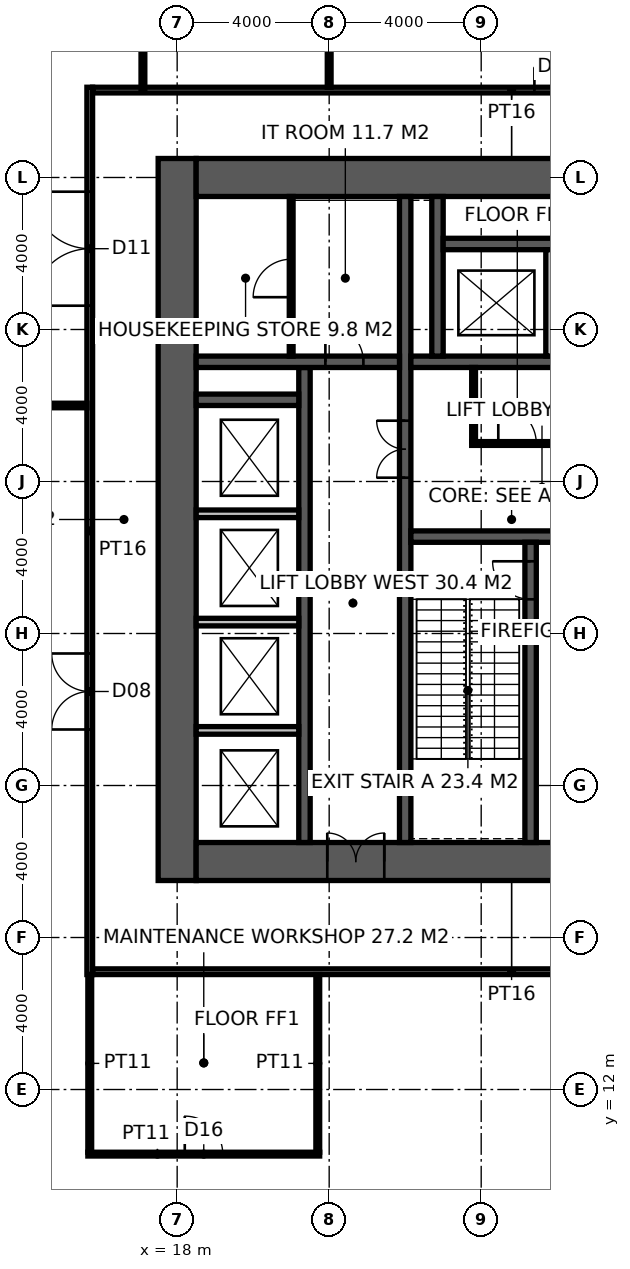
"""IFC4 building model, lengths in metres.
Left out: names, types, materials, properties, quantities, classifications, styles, units other than length and angle.
Written with IfcOpenShell. Run it as: python <this file> out.ifc"""

import sys

from ifc_helpers import new_model, si_unit, direction, frame, frame_2d, origin, place, context, subcontext, project, spatial, rectangle, extrude, element, fill, save


model = new_model("IFC4")
c1 = context("Model", 3, precision=1e-05, world=origin(), true_north=direction((0.0, 1.0)))
c2 = subcontext(c1, "Body", "Model", "MODEL_VIEW")
j1 = project(units=[si_unit("LENGTHUNIT", "METRE"), si_unit("PLANEANGLEUNIT", "RADIAN")], contexts=[c1])
p1 = place(None, origin())
s1 = spatial("IfcSite", under=j1, at=p1, CompositionType="ELEMENT")
p2 = place(p1, origin())
s2 = spatial("IfcBuilding", under=s1, at=p2, CompositionType="ELEMENT")
p3 = place(p2, frame((0.0, 0.0, 137.4)))
s3 = spatial("IfcBuildingStorey", under=s2, at=p3, CompositionType="ELEMENT", Elevation=137.4)
p4 = place(p3, frame((18.0, 17.5, -0.15), z_axis=(0.0, 0.0, 1.0), x_axis=(0.0, 1.0, 0.0)))
e1 = element("IfcWall", 1, at=p4, inside=s3, PredefinedType="SHEAR", context=c2, shape_type="SweptSolid", body=[
    extrude(rectangle(XDim=19.0, YDim=1.0, at=frame_2d((9.5, 0.0))), origin(), (0.0, 0.0, 1.0), 5.4),
])
p5 = place(p3, frame((18.5, 18.0, -0.15), z_axis=(0.0, 0.0, 1.0), x_axis=(1.0, 0.0, 0.0)))
e2 = element("IfcWall", 2, at=p5, inside=s3, PredefinedType="SHEAR", context=c2, shape_type="SweptSolid", body=[
    extrude(rectangle(XDim=17.6, YDim=1.0, at=frame_2d((8.8, 0.0))), origin(), (0.0, 0.0, 1.0), 5.4),
])
p6 = place(p5, frame((3.45, 0.0, 0.15)))
e3 = element("IfcOpeningElement", 3, at=p6, cuts=e2, PredefinedType="OPENING", context=c2, shape_type="SweptSolid", body=[
    extrude(rectangle(XDim=1.5, YDim=2.4, at=frame_2d((0.75, 1.2))), frame((0.0, 0.51, 0.0), z_axis=(0.0, -1.0, 0.0), x_axis=(1.0, 0.0, 0.0)), (0.0, 0.0, 1.0), 1.02),
])
p7 = place(p3, frame((18.5, 36.0, -0.15), z_axis=(0.0, 0.0, 1.0), x_axis=(1.0, 0.0, 0.0)))
e4 = element("IfcWall", 4, at=p7, inside=s3, PredefinedType="SHEAR", context=c2, shape_type="SweptSolid", body=[
    extrude(rectangle(XDim=17.6, YDim=1.0, at=frame_2d((8.8, 0.0))), origin(), (0.0, 0.0, 1.0), 5.4),
])
p8 = place(p3, frame((24.0, 18.5, -0.15), z_axis=(0.0, 0.0, 1.0), x_axis=(0.0, 1.0, 0.0)))
e5 = element("IfcWall", 5, at=p8, inside=s3, PredefinedType="SHEAR", context=c2, shape_type="SweptSolid", body=[
    extrude(rectangle(XDim=17.0, YDim=0.3, at=frame_2d((8.5, 0.0))), origin(), (0.0, 0.0, 1.0), 5.4),
])
p9 = place(p8, frame((9.6, 0.0, 0.15)))
e6 = element("IfcOpeningElement", 6, at=p9, cuts=e5, PredefinedType="OPENING", context=c2, shape_type="SweptSolid", body=[
    extrude(rectangle(XDim=1.5, YDim=2.4, at=frame_2d((0.75, 1.2))), frame((0.0, 0.16, 0.0), z_axis=(0.0, -1.0, 0.0), x_axis=(1.0, 0.0, 0.0)), (0.0, 0.0, 1.0), 0.32),
])
p10 = place(p3, frame((24.15, 26.55, -0.15), z_axis=(0.0, 0.0, 1.0), x_axis=(1.0, 0.0, 0.0)))
e7 = element("IfcWall", 7, at=p10, inside=s3, PredefinedType="SHEAR", context=c2, shape_type="SweptSolid", body=[
    extrude(rectangle(XDim=11.25, YDim=0.3, at=frame_2d((5.625, 0.0))), origin(), (0.0, 0.0, 1.0), 5.4),
])
p11 = place(p10, frame((9.25, 0.0, 0.15)))
e8 = element("IfcOpeningElement", 8, at=p11, cuts=e7, PredefinedType="OPENING", context=c2, shape_type="SweptSolid", body=[
    extrude(rectangle(XDim=1.0, YDim=2.2, at=frame_2d((0.5, 1.1))), frame((0.0, 0.16, 0.0), z_axis=(0.0, -1.0, 0.0), x_axis=(1.0, 0.0, 0.0)), (0.0, 0.0, 1.0), 0.32),
])
p12 = place(p10, frame((4.9, 0.0, 0.15)))
e9 = element("IfcOpeningElement", 9, at=p12, cuts=e7, PredefinedType="OPENING", context=c2, shape_type="SweptSolid", body=[
    extrude(rectangle(XDim=1.5, YDim=2.4, at=frame_2d((0.75, 1.2))), frame((0.0, 0.16, 0.0), z_axis=(0.0, -1.0, 0.0), x_axis=(1.0, 0.0, 0.0)), (0.0, 0.0, 1.0), 0.32),
])
p13 = place(p3, frame((27.3, 18.5, -0.15), z_axis=(0.0, 0.0, 1.0), x_axis=(0.0, 1.0, 0.0)))
e10 = element("IfcWall", 10, at=p13, inside=s3, PredefinedType="SHEAR", context=c2, shape_type="SweptSolid", body=[
    extrude(rectangle(XDim=7.9, YDim=0.3, at=frame_2d((3.95, 0.0))), origin(), (0.0, 0.0, 1.0), 5.4),
])
p14 = place(p13, frame((6.4, 0.0, 0.15)))
e11 = element("IfcOpeningElement", 11, at=p14, cuts=e10, PredefinedType="OPENING", context=c2, shape_type="SweptSolid", body=[
    extrude(rectangle(XDim=1.0, YDim=2.2, at=frame_2d((0.5, 1.1))), frame((0.0, 0.16, 0.0), z_axis=(0.0, -1.0, 0.0), x_axis=(1.0, 0.0, 0.0)), (0.0, 0.0, 1.0), 0.32),
])
p15 = place(p3, frame((24.15, 31.15, -0.15), z_axis=(0.0, 0.0, 1.0), x_axis=(1.0, 0.0, 0.0)))
e12 = element("IfcWall", 12, at=p15, inside=s3, PredefinedType="SHEAR", context=c2, shape_type="SweptSolid", body=[
    extrude(rectangle(XDim=11.25, YDim=0.3, at=frame_2d((5.625, 0.0))), origin(), (0.0, 0.0, 1.0), 5.4),
])
p16 = place(p15, frame((7.25, 0.0, 0.15)))
e13 = element("IfcOpeningElement", 13, at=p16, cuts=e12, PredefinedType="OPENING", context=c2, shape_type="SweptSolid", body=[
    extrude(rectangle(XDim=1.4, YDim=2.4, at=frame_2d((0.7, 1.2))), frame((0.0, 0.16, 0.0), z_axis=(0.0, -1.0, 0.0), x_axis=(1.0, 0.0, 0.0)), (0.0, 0.0, 1.0), 0.32),
])
p17 = place(p3, frame((21.35, 18.5, -0.15), z_axis=(0.0, 0.0, 1.0), x_axis=(0.0, 1.0, 0.0)))
e14 = element("IfcWall", 14, at=p17, inside=s3, PredefinedType="SHEAR", context=c2, shape_type="SweptSolid", body=[
    extrude(rectangle(XDim=12.5, YDim=0.3, at=frame_2d((6.25, 0.0))), origin(), (0.0, 0.0, 1.0), 5.4),
])
p18 = place(p3, frame((18.5, 31.15, -0.15), z_axis=(0.0, 0.0, 1.0), x_axis=(1.0, 0.0, 0.0)))
e15 = element("IfcWall", 15, at=p18, inside=s3, PredefinedType="SHEAR", context=c2, shape_type="SweptSolid", body=[
    extrude(rectangle(XDim=5.35, YDim=0.3, at=frame_2d((2.675, 0.0))), origin(), (0.0, 0.0, 1.0), 5.4),
])
p19 = place(p18, frame((3.4, 0.0, 0.15)))
e16 = element("IfcOpeningElement", 16, at=p19, cuts=e15, PredefinedType="OPENING", context=c2, shape_type="SweptSolid", body=[
    extrude(rectangle(XDim=1.0, YDim=2.2, at=frame_2d((0.5, 1.1))), frame((0.0, 0.16, 0.0), z_axis=(0.0, -1.0, 0.0), x_axis=(1.0, 0.0, 0.0)), (0.0, 0.0, 1.0), 0.32),
])
p20 = place(p3, frame((18.5, 30.15, -0.15), z_axis=(0.0, 0.0, 1.0), x_axis=(1.0, 0.0, 0.0)))
e17 = element("IfcWall", 17, at=p20, inside=s3, PredefinedType="SHEAR", context=c2, shape_type="SweptSolid", body=[
    extrude(rectangle(XDim=2.7, YDim=0.3, at=frame_2d((1.35, 0.0))), origin(), (0.0, 0.0, 1.0), 5.4),
])
p21 = place(p3, frame((24.85, 31.3, -0.15), z_axis=(0.0, 0.0, 1.0), x_axis=(0.0, 1.0, 0.0)))
e18 = element("IfcWall", 18, at=p21, inside=s3, PredefinedType="SHEAR", context=c2, shape_type="SweptSolid", body=[
    extrude(rectangle(XDim=4.2, YDim=0.3, at=frame_2d((2.1, 0.0))), origin(), (0.0, 0.0, 1.0), 5.4),
])
p22 = place(p3, frame((25.0, 34.25, -0.15), z_axis=(0.0, 0.0, 1.0), x_axis=(1.0, 0.0, 0.0)))
e19 = element("IfcWall", 19, at=p22, inside=s3, PredefinedType="SHEAR", context=c2, shape_type="SweptSolid", body=[
    extrude(rectangle(XDim=8.6, YDim=0.3, at=frame_2d((4.3, 0.0))), origin(), (0.0, 0.0, 1.0), 5.4),
])
p23 = place(p3, frame((27.8, 31.3, -0.15), z_axis=(0.0, 0.0, 1.0), x_axis=(0.0, 1.0, 0.0)))
e20 = element("IfcWall", 20, at=p23, inside=s3, PredefinedType="SOLIDWALL", context=c2, shape_type="SweptSolid", body=[
    extrude(rectangle(XDim=2.8, YDim=0.2, at=frame_2d((1.4, 0.0))), origin(), (0.0, 0.0, 1.0), 5.4),
])
for number, where, z_axis, x_axis in (
    (21, (18.5, 21.45, 0.0), (0.0, 0.0, 1.0), (1.0, 0.0, 0.0)),
    (22, (18.5, 24.3, 0.0), (0.0, 0.0, 1.0), (1.0, 0.0, 0.0)),
    (23, (18.5, 27.15, 0.0), (0.0, 0.0, 1.0), (1.0, 0.0, 0.0)),
):
    element("IfcWall", number, at=place(p3, frame(where, z_axis=z_axis, x_axis=x_axis)), inside=s3, PredefinedType="SOLIDWALL", context=c2, shape_type="SweptSolid", body=[
        extrude(rectangle(XDim=2.7, YDim=0.2, at=frame_2d((1.35, 0.0))), origin(), (0.0, 0.0, 1.0), 5.25),
    ])
p24 = place(p3, frame((21.0, 31.3, 0.0), z_axis=(0.0, 0.0, 1.0), x_axis=(0.0, 1.0, 0.0)))
e24 = element("IfcWall", 24, at=p24, inside=s3, PredefinedType="PARTITIONING", context=c2, shape_type="SweptSolid", body=[
    extrude(rectangle(XDim=4.2, YDim=0.1, at=frame_2d((2.1, 0.0))), origin(), (0.0, 0.0, 1.0), 5.25),
])
p25 = place(p24, frame((1.55, 0.0, 0.0)))
e25 = element("IfcOpeningElement", 25, at=p25, cuts=e24, PredefinedType="OPENING", context=c2, shape_type="SweptSolid", body=[
    extrude(rectangle(XDim=1.0, YDim=2.2, at=frame_2d((0.5, 1.1))), frame((0.0, 0.06, 0.0), z_axis=(0.0, -1.0, 0.0), x_axis=(1.0, 0.0, 0.0)), (0.0, 0.0, 1.0), 0.12),
])
p26 = place(p3, frame((25.75, 29.0, 0.0), z_axis=(0.0, 0.0, 1.0), x_axis=(1.0, 0.0, 0.0)))
e26 = element("IfcWall", 26, at=p26, inside=s3, PredefinedType="PARTITIONING", context=c2, shape_type="SweptSolid", body=[
    extrude(rectangle(XDim=4.7, YDim=0.1, at=frame_2d((2.35, 0.0))), origin(), (0.0, 0.0, 1.0), 5.25),
])
p27 = place(p26, frame((0.7, 0.0, 0.0)))
e27 = element("IfcOpeningElement", 27, at=p27, cuts=e26, PredefinedType="OPENING", context=c2, shape_type="SweptSolid", body=[
    extrude(rectangle(XDim=1.0, YDim=2.2, at=frame_2d((0.5, 1.1))), frame((0.0, 0.06, 0.0), z_axis=(0.0, -1.0, 0.0), x_axis=(1.0, 0.0, 0.0)), (0.0, 0.0, 1.0), 0.12),
])
p28 = place(p26, frame((3.0, 0.0, 0.0)))
e28 = element("IfcOpeningElement", 28, at=p28, cuts=e26, PredefinedType="OPENING", context=c2, shape_type="SweptSolid", body=[
    extrude(rectangle(XDim=1.0, YDim=2.2, at=frame_2d((0.5, 1.1))), frame((0.0, 0.06, 0.0), z_axis=(0.0, -1.0, 0.0), x_axis=(1.0, 0.0, 0.0)), (0.0, 0.0, 1.0), 0.12),
])
p29 = place(p3, frame((25.8, 29.05, 0.0), z_axis=(0.0, 0.0, 1.0), x_axis=(0.0, 1.0, 0.0)))
e29 = element("IfcWall", 29, at=p29, inside=s3, PredefinedType="PARTITIONING", context=c2, shape_type="SweptSolid", body=[
    extrude(rectangle(XDim=1.95, YDim=0.1, at=frame_2d((0.975, 0.0))), origin(), (0.0, 0.0, 1.0), 5.25),
])
p30 = place(p3, frame((15.7, 15.025, 0.0), z_axis=(0.0, 0.0, 1.0), x_axis=(0.0, 1.0, 0.0)))
e30 = element("IfcWall", 30, at=p30, inside=s3, PredefinedType="PARTITIONING", context=c2, shape_type="SweptSolid", body=[
    extrude(rectangle(XDim=23.35, YDim=0.15, at=frame_2d((11.675, 0.0))), origin(), (0.0, 0.0, 1.0), 5.25),
])
p31 = place(p30, frame((6.449, 0.0, 0.0)))
e31 = element("IfcOpeningElement", 31, at=p31, cuts=e30, PredefinedType="OPENING", context=c2, shape_type="SweptSolid", body=[
    extrude(rectangle(XDim=2.0, YDim=2.4, at=frame_2d((1.0, 1.2))), frame((0.0, 0.085, 0.0), z_axis=(0.0, -1.0, 0.0), x_axis=(1.0, 0.0, 0.0)), (0.0, 0.0, 1.0), 0.17),
])
p32 = place(p30, frame((17.601, 0.0, 0.0)))
e32 = element("IfcOpeningElement", 32, at=p32, cuts=e30, PredefinedType="OPENING", context=c2, shape_type="SweptSolid", body=[
    extrude(rectangle(XDim=3.0, YDim=3.3, at=frame_2d((1.5, 1.65))), frame((0.0, 0.085, 0.0), z_axis=(0.0, -1.0, 0.0), x_axis=(1.0, 0.0, 0.0)), (0.0, 0.0, 1.0), 0.17),
])
p33 = place(p3, frame((15.775, 15.1, 0.0), z_axis=(0.0, 0.0, 1.0), x_axis=(1.0, 0.0, 0.0)))
e33 = element("IfcWall", 33, at=p33, inside=s3, PredefinedType="PARTITIONING", context=c2, shape_type="SweptSolid", body=[
    extrude(rectangle(XDim=22.05, YDim=0.15, at=frame_2d((11.025, 0.0))), origin(), (0.0, 0.0, 1.0), 5.25),
])
p34 = place(p3, frame((15.775, 38.3, 0.0), z_axis=(0.0, 0.0, 1.0), x_axis=(1.0, 0.0, 0.0)))
e34 = element("IfcWall", 34, at=p34, inside=s3, PredefinedType="PARTITIONING", context=c2, shape_type="SweptSolid", body=[
    extrude(rectangle(XDim=22.05, YDim=0.15, at=frame_2d((11.025, 0.0))), origin(), (0.0, 0.0, 1.0), 5.25),
])
p35 = place(p34, frame((11.625, 0.0, 0.0)))
e35 = element("IfcOpeningElement", 35, at=p35, cuts=e34, PredefinedType="OPENING", context=c2, shape_type="SweptSolid", body=[
    extrude(rectangle(XDim=1.2, YDim=2.2, at=frame_2d((0.6, 1.1))), frame((0.0, 0.085, 0.0), z_axis=(0.0, -1.0, 0.0), x_axis=(1.0, 0.0, 0.0)), (0.0, 0.0, 1.0), 0.17),
])
p36 = place(p3, frame((22.0, 38.375, 0.0), z_axis=(0.0, 0.0, 1.0), x_axis=(0.0, 1.0, 0.0)))
e36 = element("IfcWall", 36, at=p36, inside=s3, PredefinedType="PARTITIONING", context=c2, shape_type="SweptSolid", body=[
    extrude(rectangle(XDim=3.675, YDim=0.1, at=frame_2d((1.837, 0.0))), origin(), (0.0, 0.0, 1.0), 4.35),
])
p37 = place(p3, frame((6.68, 30.0, 0.0), z_axis=(0.0, 0.0, 1.0), x_axis=(1.0, 0.0, 0.0)))
e37 = element("IfcWall", 37, at=p37, inside=s3, PredefinedType="PARTITIONING", context=c2, shape_type="SweptSolid", body=[
    extrude(rectangle(XDim=8.945, YDim=0.12, at=frame_2d((4.473, 0.0))), origin(), (0.0, 0.0, 1.0), 5.25),
])
p38 = place(p3, frame((15.65, 10.3, 0.0), z_axis=(0.0, 0.0, 1.0), x_axis=(1.0, 0.0, 0.0)))
e38 = element("IfcWall", 38, at=p38, inside=s3, PredefinedType="PARTITIONING", context=c2, shape_type="SweptSolid", body=[
    extrude(rectangle(XDim=6.1, YDim=0.1, at=frame_2d((3.05, 0.0))), origin(), (0.0, 0.0, 1.0), 5.25),
])
p39 = place(p38, frame((2.55, 0.0, 0.0)))
e39 = element("IfcOpeningElement", 39, at=p39, cuts=e38, PredefinedType="OPENING", context=c2, shape_type="SweptSolid", body=[
    extrude(rectangle(XDim=1.0, YDim=2.2, at=frame_2d((0.5, 1.1))), frame((0.0, 0.06, 0.0), z_axis=(0.0, -1.0, 0.0), x_axis=(1.0, 0.0, 0.0)), (0.0, 0.0, 1.0), 0.12),
])
for number, where, z_axis, x_axis in (
    (40, (15.7, 10.35, 0.0), (0.0, 0.0, 1.0), (0.0, 1.0, 0.0)),
    (41, (21.7, 10.35, 0.0), (0.0, 0.0, 1.0), (0.0, 1.0, 0.0)),
):
    element("IfcWall", number, at=place(p3, frame(where, z_axis=z_axis, x_axis=x_axis)), inside=s3, PredefinedType="PARTITIONING", context=c2, shape_type="SweptSolid", body=[
        extrude(rectangle(XDim=4.675, YDim=0.1, at=frame_2d((2.337, 0.0))), origin(), (0.0, 0.0, 1.0), 5.25),
    ])
p40 = place(p3, frame((17.099, 51.32, 0.0), z_axis=(0.0, 0.0, 1.0), x_axis=(0.0, -1.0, 0.0)))
e42 = element("IfcWall", 42, at=p40, inside=s3, PredefinedType="PARTITIONING", context=c2, shape_type="SweptSolid", body=[
    extrude(rectangle(XDim=13.02, YDim=0.1, at=frame_2d((6.51, 0.0))), origin(), (0.0, 0.0, 1.0), 5.25),
])
p41 = place(p40, frame((4.76, 0.0, 0.0)))
e43 = element("IfcOpeningElement", 43, at=p41, cuts=e42, PredefinedType="OPENING", context=c2, shape_type="SweptSolid", body=[
    extrude(rectangle(XDim=2.0, YDim=2.4, at=frame_2d((1.0, 1.2))), frame((0.0, 0.06, 0.0), z_axis=(0.0, -1.0, 0.0), x_axis=(1.0, 0.0, 0.0)), (0.0, 0.0, 1.0), 0.12),
])
p42 = place(p14, origin())
e44 = element("IfcDoor", 44, at=p42, inside=s3, OperationType="SINGLE_SWING_RIGHT", PredefinedType="DOOR", context=c2, shape_type="SweptSolid", body=[
    extrude(rectangle(XDim=1.0, YDim=2.2, at=frame_2d((0.5, 1.1))), frame((0.0, 0.025, 0.0), z_axis=(0.0, -1.0, 0.0), x_axis=(1.0, 0.0, 0.0)), (0.0, 0.0, 1.0), 0.05),
])
fill(e11, e44)
p43 = place(p9, origin())
e45 = element("IfcDoor", 45, at=p43, inside=s3, OperationType="DOUBLE_DOOR_DOUBLE_SWING", PredefinedType="DOOR", context=c2, shape_type="SweptSolid", body=[
    extrude(rectangle(XDim=1.5, YDim=2.4, at=frame_2d((0.75, 1.2))), frame((0.0, 0.025, 0.0), z_axis=(0.0, -1.0, 0.0), x_axis=(1.0, 0.0, 0.0)), (0.0, 0.0, 1.0), 0.05),
])
fill(e6, e45)
p44 = place(p19, origin())
e46 = element("IfcDoor", 46, at=p44, inside=s3, OperationType="SINGLE_SWING_LEFT", PredefinedType="DOOR", context=c2, shape_type="SweptSolid", body=[
    extrude(rectangle(XDim=1.0, YDim=2.2, at=frame_2d((0.5, 1.1))), frame((0.0, 0.025, 0.0), z_axis=(0.0, -1.0, 0.0), x_axis=(1.0, 0.0, 0.0)), (0.0, 0.0, 1.0), 0.05),
])
fill(e16, e46)
p45 = place(p25, origin())
e47 = element("IfcDoor", 47, at=p45, inside=s3, OperationType="SINGLE_SWING_LEFT", PredefinedType="DOOR", context=c2, shape_type="SweptSolid", body=[
    extrude(rectangle(XDim=1.0, YDim=2.2, at=frame_2d((0.5, 1.1))), frame((0.0, 0.025, 0.0), z_axis=(0.0, -1.0, 0.0), x_axis=(1.0, 0.0, 0.0)), (0.0, 0.0, 1.0), 0.05),
])
fill(e25, e47)
p46 = place(p27, origin())
e48 = element("IfcDoor", 48, at=p46, inside=s3, OperationType="SINGLE_SWING_LEFT", PredefinedType="DOOR", context=c2, shape_type="SweptSolid", body=[
    extrude(rectangle(XDim=1.0, YDim=2.2, at=frame_2d((0.5, 1.1))), frame((0.0, 0.025, 0.0), z_axis=(0.0, -1.0, 0.0), x_axis=(1.0, 0.0, 0.0)), (0.0, 0.0, 1.0), 0.05),
])
fill(e27, e48)
p47 = place(p6, origin())
e49 = element("IfcDoor", 49, at=p47, inside=s3, OperationType="DOUBLE_DOOR_DOUBLE_SWING", PredefinedType="DOOR", context=c2, shape_type="SweptSolid", body=[
    extrude(rectangle(XDim=1.5, YDim=2.4, at=frame_2d((0.75, 1.2))), frame((0.0, 0.025, 0.0), z_axis=(0.0, -1.0, 0.0), x_axis=(1.0, 0.0, 0.0)), (0.0, 0.0, 1.0), 0.05),
])
fill(e3, e49)
p48 = place(p35, origin())
e50 = element("IfcDoor", 50, at=p48, inside=s3, OperationType="DOUBLE_DOOR_DOUBLE_SWING", PredefinedType="DOOR", context=c2, shape_type="SweptSolid", body=[
    extrude(rectangle(XDim=1.2, YDim=2.2, at=frame_2d((0.6, 1.1))), frame((0.0, 0.025, 0.0), z_axis=(0.0, -1.0, 0.0), x_axis=(1.0, 0.0, 0.0)), (0.0, 0.0, 1.0), 0.05),
])
fill(e35, e50)
p49 = place(p31, origin())
e51 = element("IfcDoor", 51, at=p49, inside=s3, OperationType="DOUBLE_DOOR_DOUBLE_SWING", PredefinedType="DOOR", context=c2, shape_type="SweptSolid", body=[
    extrude(rectangle(XDim=2.0, YDim=2.4, at=frame_2d((1.0, 1.2))), frame((0.0, 0.025, 0.0), z_axis=(0.0, -1.0, 0.0), x_axis=(1.0, 0.0, 0.0)), (0.0, 0.0, 1.0), 0.05),
])
fill(e31, e51)
p50 = place(p32, origin())
e52 = element("IfcDoor", 52, at=p50, inside=s3, OperationType="DOUBLE_DOOR_DOUBLE_SWING", PredefinedType="DOOR", context=c2, shape_type="SweptSolid", body=[
    extrude(rectangle(XDim=3.0, YDim=3.3, at=frame_2d((1.5, 1.65))), frame((0.0, 0.025, 0.0), z_axis=(0.0, -1.0, 0.0), x_axis=(1.0, 0.0, 0.0)), (0.0, 0.0, 1.0), 0.05),
])
fill(e32, e52)
p51 = place(p39, origin())
e53 = element("IfcDoor", 53, at=p51, inside=s3, OperationType="SINGLE_SWING_LEFT", PredefinedType="DOOR", context=c2, shape_type="SweptSolid", body=[
    extrude(rectangle(XDim=1.0, YDim=2.2, at=frame_2d((0.5, 1.1))), frame((0.0, 0.025, 0.0), z_axis=(0.0, -1.0, 0.0), x_axis=(1.0, 0.0, 0.0)), (0.0, 0.0, 1.0), 0.05),
])
fill(e39, e53)
save(model, sys.argv[1])
